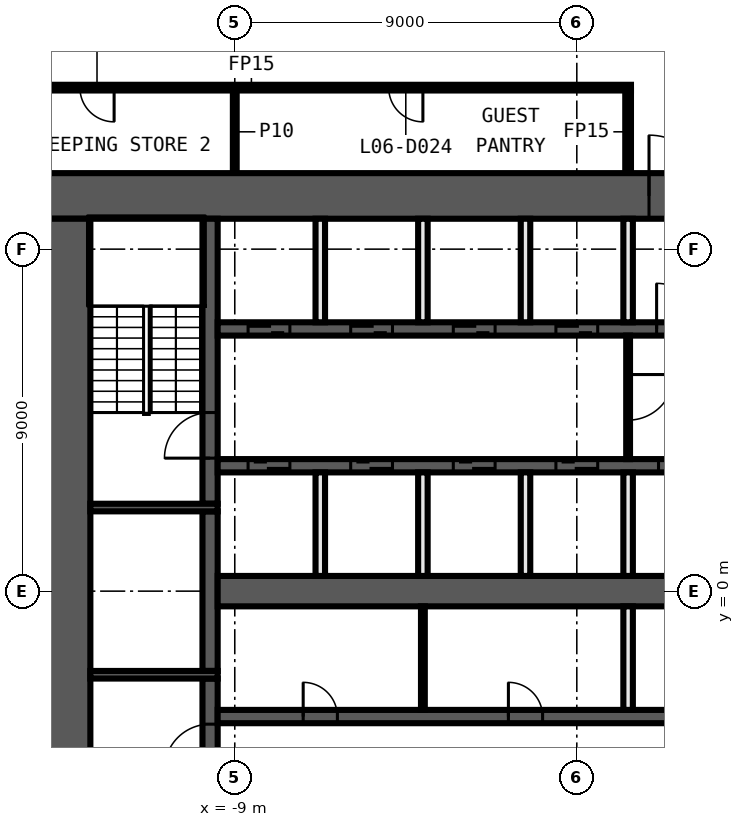
"""IFC4 building model, lengths in metres.
Left out: names, types, materials, properties, quantities, classifications, styles, units other than length and angle.
Written with IfcOpenShell. Run it as: python <this file> out.ifc"""

import sys

from ifc_helpers import new_model, si_unit, direction, frame, frame_2d, origin, place, context, subcontext, project, spatial, rectangle, extrude, element, fill, save


model = new_model("IFC4")
c1 = context("Model", 3, precision=1e-05, world=origin(), true_north=direction((0.0, 1.0)))
c2 = subcontext(c1, "Body", "Model", "MODEL_VIEW")
j1 = project(units=[si_unit("LENGTHUNIT", "METRE"), si_unit("PLANEANGLEUNIT", "RADIAN")], contexts=[c1])
p1 = place(None, origin())
s1 = spatial("IfcSite", under=j1, at=p1, CompositionType="ELEMENT")
p2 = place(p1, origin())
s2 = spatial("IfcBuilding", under=s1, at=p2, CompositionType="ELEMENT")
p3 = place(p2, frame((0.0, 0.0, 44.0)))
s3 = spatial("IfcBuildingStorey", under=s2, at=p3, CompositionType="ELEMENT", Elevation=44.0)
p4 = place(p3, frame((1.425, 13.25, 0.0), z_axis=(0.0, 0.0, 1.0), x_axis=(-1.0, 0.0, 0.0)))
e1 = element("IfcWall", 1, at=p4, inside=s3, PredefinedType="PARTITIONING", context=c2, shape_type="SweptSolid", body=[
    extrude(rectangle(XDim=17.75, YDim=0.15, at=frame_2d((8.875, 0.0))), origin(), (0.0, 0.0, 1.0), 3.3),
])
p5 = place(p4, frame((5.475, 0.0, 0.0)))
e2 = element("IfcOpeningElement", 2, at=p5, cuts=e1, PredefinedType="OPENING", context=c2, shape_type="SweptSolid", body=[
    extrude(rectangle(XDim=0.9, YDim=2.1, at=frame_2d((0.45, 1.05))), frame((0.0, 0.085, 0.0), z_axis=(0.0, -1.0, 0.0), x_axis=(1.0, 0.0, 0.0)), (0.0, 0.0, 1.0), 0.17),
])
p6 = place(p4, frame((13.6, 0.0, 0.0)))
e3 = element("IfcOpeningElement", 3, at=p6, cuts=e1, PredefinedType="OPENING", context=c2, shape_type="SweptSolid", body=[
    extrude(rectangle(XDim=0.9, YDim=2.1, at=frame_2d((0.45, 1.05))), frame((0.0, 0.085, 0.0), z_axis=(0.0, -1.0, 0.0), x_axis=(1.0, 0.0, 0.0)), (0.0, 0.0, 1.0), 0.17),
])
p7 = place(p3, frame((1.35, 11.0, 0.0), z_axis=(0.0, 0.0, 1.0), x_axis=(0.0, 1.0, 0.0)))
e4 = element("IfcWall", 4, at=p7, inside=s3, PredefinedType="PARTITIONING", context=c2, shape_type="SweptSolid", body=[
    extrude(rectangle(XDim=2.175, YDim=0.15, at=frame_2d((1.087, 0.0))), origin(), (0.0, 0.0, 1.0), 3.3),
])
p8 = place(p3, frame((-9.0, 11.0, 0.0), z_axis=(0.0, 0.0, 1.0), x_axis=(0.0, 1.0, 0.0)))
e5 = element("IfcWall", 5, at=p8, inside=s3, PredefinedType="PARTITIONING", context=c2, shape_type="SweptSolid", body=[
    extrude(rectangle(XDim=2.175, YDim=0.1, at=frame_2d((1.087, 0.0))), origin(), (0.0, 0.0, 1.0), 3.3),
])
p9 = place(p3, frame((-14.0, 10.4, 0.0), z_axis=(0.0, 0.0, 1.0), x_axis=(1.0, 0.0, 0.0)))
e6 = element("IfcWall", 6, at=p9, inside=s3, PredefinedType="SHEAR", context=c2, shape_type="SweptSolid", body=[
    extrude(rectangle(XDim=28.0, YDim=1.2, at=frame_2d((14.0, 0.0))), origin(), (0.0, 0.0, 1.0), 3.3),
])
p10 = place(p9, frame((15.9, 0.0, 0.0)))
e7 = element("IfcOpeningElement", 7, at=p10, cuts=e6, PredefinedType="OPENING", context=c2, shape_type="SweptSolid", body=[
    extrude(rectangle(XDim=1.6, YDim=2.1, at=frame_2d((0.8, 1.05))), frame((0.0, 0.61, 0.0), z_axis=(0.0, -1.0, 0.0), x_axis=(1.0, 0.0, 0.0)), (0.0, 0.0, 1.0), 1.22),
])
p11 = place(p3, frame((-13.4, -9.8, 0.0), z_axis=(0.0, 0.0, 1.0), x_axis=(0.0, 1.0, 0.0)))
e8 = element("IfcWall", 8, at=p11, inside=s3, PredefinedType="SHEAR", context=c2, shape_type="SweptSolid", body=[
    extrude(rectangle(XDim=19.6, YDim=1.2, at=frame_2d((9.8, 0.0))), origin(), (0.0, 0.0, 1.0), 3.3),
])
p12 = place(p3, frame((-9.65, -9.8, 0.0), z_axis=(0.0, 0.0, 1.0), x_axis=(0.0, 1.0, 0.0)))
e9 = element("IfcWall", 9, at=p12, inside=s3, PredefinedType="SHEAR", context=c2, shape_type="SweptSolid", body=[
    extrude(rectangle(XDim=7.5, YDim=0.4, at=frame_2d((3.75, 0.0))), origin(), (0.0, 0.0, 1.0), 3.3),
])
p13 = place(p12, frame((5.1, 0.0, 0.0)))
e10 = element("IfcOpeningElement", 10, at=p13, cuts=e9, PredefinedType="OPENING", context=c2, shape_type="SweptSolid", body=[
    extrude(rectangle(XDim=1.2, YDim=2.1, at=frame_2d((0.6, 1.05))), frame((0.0, 0.21, 0.0), z_axis=(0.0, -1.0, 0.0), x_axis=(1.0, 0.0, 0.0)), (0.0, 0.0, 1.0), 0.42),
])
p14 = place(p3, frame((-9.65, -2.1, 0.0), z_axis=(0.0, 0.0, 1.0), x_axis=(0.0, 1.0, 0.0)))
e11 = element("IfcWall", 11, at=p14, inside=s3, PredefinedType="SHEAR", context=c2, shape_type="SweptSolid", body=[
    extrude(rectangle(XDim=4.2, YDim=0.4, at=frame_2d((2.1, 0.0))), origin(), (0.0, 0.0, 1.0), 3.3),
])
p15 = place(p3, frame((-9.65, 2.3, 0.0), z_axis=(0.0, 0.0, 1.0), x_axis=(0.0, 1.0, 0.0)))
e12 = element("IfcWall", 12, at=p15, inside=s3, PredefinedType="SHEAR", context=c2, shape_type="SweptSolid", body=[
    extrude(rectangle(XDim=7.5, YDim=0.4, at=frame_2d((3.75, 0.0))), origin(), (0.0, 0.0, 1.0), 3.3),
])
p16 = place(p15, frame((1.2, 0.0, 0.0)))
e13 = element("IfcOpeningElement", 13, at=p16, cuts=e12, PredefinedType="OPENING", context=c2, shape_type="SweptSolid", body=[
    extrude(rectangle(XDim=1.2, YDim=2.1, at=frame_2d((0.6, 1.05))), frame((0.0, 0.21, 0.0), z_axis=(0.0, -1.0, 0.0), x_axis=(1.0, 0.0, 0.0)), (0.0, 0.0, 1.0), 0.42),
])
for number, where, z_axis, x_axis in (
    (14, (-9.45, 2.2, 0.0), (0.0, 0.0, 1.0), (-1.0, 0.0, 0.0)),
    (15, (-9.45, -2.2, 0.0), (0.0, 0.0, 1.0), (-1.0, 0.0, 0.0)),
):
    element("IfcWall", number, at=place(p3, frame(where, z_axis=z_axis, x_axis=x_axis)), inside=s3, PredefinedType="SHEAR", context=c2, shape_type="SweptSolid", body=[
        extrude(rectangle(XDim=3.35, YDim=0.2, at=frame_2d((1.675, 0.0))), origin(), (0.0, 0.0, 1.0), 3.3),
    ])
p17 = place(p3, frame((-9.45, 6.9, 0.0), z_axis=(0.0, 0.0, 1.0), x_axis=(1.0, 0.0, 0.0)))
e16 = element("IfcWall", 16, at=p17, inside=s3, PredefinedType="SHEAR", context=c2, shape_type="SweptSolid", body=[
    extrude(rectangle(XDim=18.9, YDim=0.35, at=frame_2d((9.45, 0.0))), origin(), (0.0, 0.0, 1.0), 3.3),
])
p18 = place(p17, frame((0.8, 0.0, 0.0)))
e17 = element("IfcOpeningElement", 17, at=p18, cuts=e16, PredefinedType="OPENING", context=c2, shape_type="SweptSolid", body=[
    extrude(rectangle(XDim=1.1, YDim=2.1, at=frame_2d((0.55, 1.05))), frame((0.0, 0.185, 0.0), z_axis=(0.0, -1.0, 0.0), x_axis=(1.0, 0.0, 0.0)), (0.0, 0.0, 1.0), 0.37),
])
p19 = place(p17, frame((3.5, 0.0, 0.0)))
e18 = element("IfcOpeningElement", 18, at=p19, cuts=e16, PredefinedType="OPENING", context=c2, shape_type="SweptSolid", body=[
    extrude(rectangle(XDim=1.1, YDim=2.1, at=frame_2d((0.55, 1.05))), frame((0.0, 0.185, 0.0), z_axis=(0.0, -1.0, 0.0), x_axis=(1.0, 0.0, 0.0)), (0.0, 0.0, 1.0), 0.37),
])
p20 = place(p17, frame((6.2, 0.0, 0.0)))
e19 = element("IfcOpeningElement", 19, at=p20, cuts=e16, PredefinedType="OPENING", context=c2, shape_type="SweptSolid", body=[
    extrude(rectangle(XDim=1.1, YDim=2.1, at=frame_2d((0.55, 1.05))), frame((0.0, 0.185, 0.0), z_axis=(0.0, -1.0, 0.0), x_axis=(1.0, 0.0, 0.0)), (0.0, 0.0, 1.0), 0.37),
])
p21 = place(p17, frame((8.9, 0.0, 0.0)))
e20 = element("IfcOpeningElement", 20, at=p21, cuts=e16, PredefinedType="OPENING", context=c2, shape_type="SweptSolid", body=[
    extrude(rectangle(XDim=1.1, YDim=2.1, at=frame_2d((0.55, 1.05))), frame((0.0, 0.185, 0.0), z_axis=(0.0, -1.0, 0.0), x_axis=(1.0, 0.0, 0.0)), (0.0, 0.0, 1.0), 0.37),
])
p22 = place(p17, frame((11.55, 0.0, 0.0)))
e21 = element("IfcOpeningElement", 21, at=p22, cuts=e16, PredefinedType="OPENING", context=c2, shape_type="SweptSolid", body=[
    extrude(rectangle(XDim=1.2, YDim=2.1, at=frame_2d((0.6, 1.05))), frame((0.0, 0.185, 0.0), z_axis=(0.0, -1.0, 0.0), x_axis=(1.0, 0.0, 0.0)), (0.0, 0.0, 1.0), 0.37),
])
p23 = place(p17, frame((14.3, 0.0, 0.0)))
e22 = element("IfcOpeningElement", 22, at=p23, cuts=e16, PredefinedType="OPENING", context=c2, shape_type="SweptSolid", body=[
    extrude(rectangle(XDim=1.1, YDim=2.1, at=frame_2d((0.55, 1.05))), frame((0.0, 0.185, 0.0), z_axis=(0.0, -1.0, 0.0), x_axis=(1.0, 0.0, 0.0)), (0.0, 0.0, 1.0), 0.37),
])
p24 = place(p17, frame((17.0, 0.0, 0.0)))
e23 = element("IfcOpeningElement", 23, at=p24, cuts=e16, PredefinedType="OPENING", context=c2, shape_type="SweptSolid", body=[
    extrude(rectangle(XDim=1.1, YDim=2.1, at=frame_2d((0.55, 1.05))), frame((0.0, 0.185, 0.0), z_axis=(0.0, -1.0, 0.0), x_axis=(1.0, 0.0, 0.0)), (0.0, 0.0, 1.0), 0.37),
])
p25 = place(p3, frame((9.45, 3.3, 0.0), z_axis=(0.0, 0.0, 1.0), x_axis=(-1.0, 0.0, 0.0)))
e24 = element("IfcWall", 24, at=p25, inside=s3, PredefinedType="SHEAR", context=c2, shape_type="SweptSolid", body=[
    extrude(rectangle(XDim=18.9, YDim=0.35, at=frame_2d((9.45, 0.0))), origin(), (0.0, 0.0, 1.0), 3.3),
])
p26 = place(p25, frame((17.0, 0.0, 0.0)))
e25 = element("IfcOpeningElement", 25, at=p26, cuts=e24, PredefinedType="OPENING", context=c2, shape_type="SweptSolid", body=[
    extrude(rectangle(XDim=1.1, YDim=2.1, at=frame_2d((0.55, 1.05))), frame((0.0, 0.185, 0.0), z_axis=(0.0, -1.0, 0.0), x_axis=(1.0, 0.0, 0.0)), (0.0, 0.0, 1.0), 0.37),
])
p27 = place(p25, frame((14.3, 0.0, 0.0)))
e26 = element("IfcOpeningElement", 26, at=p27, cuts=e24, PredefinedType="OPENING", context=c2, shape_type="SweptSolid", body=[
    extrude(rectangle(XDim=1.1, YDim=2.1, at=frame_2d((0.55, 1.05))), frame((0.0, 0.185, 0.0), z_axis=(0.0, -1.0, 0.0), x_axis=(1.0, 0.0, 0.0)), (0.0, 0.0, 1.0), 0.37),
])
p28 = place(p25, frame((11.6, 0.0, 0.0)))
e27 = element("IfcOpeningElement", 27, at=p28, cuts=e24, PredefinedType="OPENING", context=c2, shape_type="SweptSolid", body=[
    extrude(rectangle(XDim=1.1, YDim=2.1, at=frame_2d((0.55, 1.05))), frame((0.0, 0.185, 0.0), z_axis=(0.0, -1.0, 0.0), x_axis=(1.0, 0.0, 0.0)), (0.0, 0.0, 1.0), 0.37),
])
p29 = place(p25, frame((8.9, 0.0, 0.0)))
e28 = element("IfcOpeningElement", 28, at=p29, cuts=e24, PredefinedType="OPENING", context=c2, shape_type="SweptSolid", body=[
    extrude(rectangle(XDim=1.1, YDim=2.1, at=frame_2d((0.55, 1.05))), frame((0.0, 0.185, 0.0), z_axis=(0.0, -1.0, 0.0), x_axis=(1.0, 0.0, 0.0)), (0.0, 0.0, 1.0), 0.37),
])
p30 = place(p25, frame((6.2, 0.0, 0.0)))
e29 = element("IfcOpeningElement", 29, at=p30, cuts=e24, PredefinedType="OPENING", context=c2, shape_type="SweptSolid", body=[
    extrude(rectangle(XDim=1.1, YDim=2.1, at=frame_2d((0.55, 1.05))), frame((0.0, 0.185, 0.0), z_axis=(0.0, -1.0, 0.0), x_axis=(1.0, 0.0, 0.0)), (0.0, 0.0, 1.0), 0.37),
])
p31 = place(p25, frame((3.5, 0.0, 0.0)))
e30 = element("IfcOpeningElement", 30, at=p31, cuts=e24, PredefinedType="OPENING", context=c2, shape_type="SweptSolid", body=[
    extrude(rectangle(XDim=1.1, YDim=2.1, at=frame_2d((0.55, 1.05))), frame((0.0, 0.185, 0.0), z_axis=(0.0, -1.0, 0.0), x_axis=(1.0, 0.0, 0.0)), (0.0, 0.0, 1.0), 0.37),
])
p32 = place(p25, frame((0.9, 0.0, 0.0)))
e31 = element("IfcOpeningElement", 31, at=p32, cuts=e24, PredefinedType="OPENING", context=c2, shape_type="SweptSolid", body=[
    extrude(rectangle(XDim=0.9, YDim=2.1, at=frame_2d((0.45, 1.05))), frame((0.0, 0.185, 0.0), z_axis=(0.0, -1.0, 0.0), x_axis=(1.0, 0.0, 0.0)), (0.0, 0.0, 1.0), 0.37),
])
p33 = place(p3, frame((-9.45, -3.3, 0.0), z_axis=(0.0, 0.0, 1.0), x_axis=(1.0, 0.0, 0.0)))
e32 = element("IfcWall", 32, at=p33, inside=s3, PredefinedType="SHEAR", context=c2, shape_type="SweptSolid", body=[
    extrude(rectangle(XDim=18.9, YDim=0.35, at=frame_2d((9.45, 0.0))), origin(), (0.0, 0.0, 1.0), 3.3),
])
p34 = place(p33, frame((17.0, 0.0, 0.0)))
e33 = element("IfcOpeningElement", 33, at=p34, cuts=e32, PredefinedType="OPENING", context=c2, shape_type="SweptSolid", body=[
    extrude(rectangle(XDim=1.1, YDim=2.1, at=frame_2d((0.55, 1.05))), frame((0.0, 0.185, 0.0), z_axis=(0.0, -1.0, 0.0), x_axis=(1.0, 0.0, 0.0)), (0.0, 0.0, 1.0), 0.37),
])
p35 = place(p33, frame((2.25, 0.0, 0.0)))
e34 = element("IfcOpeningElement", 34, at=p35, cuts=e32, PredefinedType="OPENING", context=c2, shape_type="SweptSolid", body=[
    extrude(rectangle(XDim=0.9, YDim=2.1, at=frame_2d((0.45, 1.05))), frame((0.0, 0.185, 0.0), z_axis=(0.0, -1.0, 0.0), x_axis=(1.0, 0.0, 0.0)), (0.0, 0.0, 1.0), 0.37),
])
p36 = place(p33, frame((7.65, 0.0, 0.0)))
e35 = element("IfcOpeningElement", 35, at=p36, cuts=e32, PredefinedType="OPENING", context=c2, shape_type="SweptSolid", body=[
    extrude(rectangle(XDim=0.9, YDim=2.1, at=frame_2d((0.45, 1.05))), frame((0.0, 0.185, 0.0), z_axis=(0.0, -1.0, 0.0), x_axis=(1.0, 0.0, 0.0)), (0.0, 0.0, 1.0), 0.37),
])
p37 = place(p3, frame((-9.45, 0.0, 0.0), z_axis=(0.0, 0.0, 1.0), x_axis=(1.0, 0.0, 0.0)))
e36 = element("IfcWall", 36, at=p37, inside=s3, PredefinedType="SHEAR", context=c2, shape_type="SweptSolid", body=[
    extrude(rectangle(XDim=18.9, YDim=0.8, at=frame_2d((9.45, 0.0))), origin(), (0.0, 0.0, 1.0), 3.3),
])
p38 = place(p3, frame((1.35, 6.725, 0.0), z_axis=(0.0, 0.0, 1.0), x_axis=(0.0, -1.0, 0.0)))
e37 = element("IfcWall", 37, at=p38, inside=s3, PredefinedType="PARTITIONING", context=c2, shape_type="SweptSolid", body=[
    extrude(rectangle(XDim=3.25, YDim=0.1, at=frame_2d((1.625, 0.0))), origin(), (0.0, 0.0, 1.0), 3.3),
])
p39 = place(p38, frame((1.025, 0.0, 0.0)))
e38 = element("IfcOpeningElement", 38, at=p39, cuts=e37, PredefinedType="OPENING", context=c2, shape_type="SweptSolid", body=[
    extrude(rectangle(XDim=1.2, YDim=2.1, at=frame_2d((0.6, 1.05))), frame((0.0, 0.06, 0.0), z_axis=(0.0, -1.0, 0.0), x_axis=(1.0, 0.0, 0.0)), (0.0, 0.0, 1.0), 0.12),
])
for number, where, z_axis, x_axis in (
    (39, (1.35, -3.125, 0.0), (0.0, 0.0, 1.0), (0.0, 1.0, 0.0)),
    (40, (1.35, 0.4, 0.0), (0.0, 0.0, 1.0), (0.0, 1.0, 0.0)),
    (41, (1.35, 7.075, 0.0), (0.0, 0.0, 1.0), (0.0, 1.0, 0.0)),
    (42, (-1.35, 0.4, 0.0), (0.0, 0.0, 1.0), (0.0, 1.0, 0.0)),
    (43, (-1.35, 7.075, 0.0), (0.0, 0.0, 1.0), (0.0, 1.0, 0.0)),
):
    element("IfcWall", number, at=place(p3, frame(where, z_axis=z_axis, x_axis=x_axis)), inside=s3, PredefinedType="SOLIDWALL", context=c2, shape_type="SweptSolid", body=[
        extrude(rectangle(XDim=2.725, YDim=0.25, at=frame_2d((1.363, 0.0))), origin(), (0.0, 0.0, 1.0), 3.3),
    ])
p40 = place(p3, frame((-4.05, -3.125, 0.0), z_axis=(0.0, 0.0, 1.0), x_axis=(0.0, 1.0, 0.0)))
e44 = element("IfcWall", 44, at=p40, inside=s3, PredefinedType="PARTITIONING", context=c2, shape_type="SweptSolid", body=[
    extrude(rectangle(XDim=2.725, YDim=0.1, at=frame_2d((1.363, 0.0))), origin(), (0.0, 0.0, 1.0), 3.3),
])
for number, where, z_axis, x_axis in (
    (45, (-4.05, 0.4, 0.0), (0.0, 0.0, 1.0), (0.0, 1.0, 0.0)),
    (46, (-4.05, 7.075, 0.0), (0.0, 0.0, 1.0), (0.0, 1.0, 0.0)),
    (47, (-6.75, 0.4, 0.0), (0.0, 0.0, 1.0), (0.0, 1.0, 0.0)),
    (48, (-6.75, 7.075, 0.0), (0.0, 0.0, 1.0), (0.0, 1.0, 0.0)),
):
    element("IfcWall", number, at=place(p3, frame(where, z_axis=z_axis, x_axis=x_axis)), inside=s3, PredefinedType="SOLIDWALL", context=c2, shape_type="SweptSolid", body=[
        extrude(rectangle(XDim=2.725, YDim=0.25, at=frame_2d((1.363, 0.0))), origin(), (0.0, 0.0, 1.0), 3.3),
    ])
p41 = place(p5, origin())
e49 = element("IfcDoor", 49, at=p41, inside=s3, OperationType="SINGLE_SWING_RIGHT", PredefinedType="DOOR", context=c2, shape_type="SweptSolid", body=[
    extrude(rectangle(XDim=0.9, YDim=2.1, at=frame_2d((0.45, 1.05))), frame((0.0, 0.025, 0.0), z_axis=(0.0, -1.0, 0.0), x_axis=(1.0, 0.0, 0.0)), (0.0, 0.0, 1.0), 0.05),
])
fill(e2, e49)
p42 = place(p6, origin())
e50 = element("IfcDoor", 50, at=p42, inside=s3, OperationType="SINGLE_SWING_LEFT", PredefinedType="DOOR", context=c2, shape_type="SweptSolid", body=[
    extrude(rectangle(XDim=0.9, YDim=2.1, at=frame_2d((0.45, 1.05))), frame((0.0, 0.025, 0.0), z_axis=(0.0, -1.0, 0.0), x_axis=(1.0, 0.0, 0.0)), (0.0, 0.0, 1.0), 0.05),
])
fill(e3, e50)
p43 = place(p18, origin())
e51 = element("IfcDoor", 51, at=p43, inside=s3, OperationType="DOUBLE_DOOR_SLIDING", PredefinedType="DOOR", context=c2, shape_type="SweptSolid", body=[
    extrude(rectangle(XDim=1.1, YDim=2.1, at=frame_2d((0.55, 1.05))), frame((0.0, 0.025, 0.0), z_axis=(0.0, -1.0, 0.0), x_axis=(1.0, 0.0, 0.0)), (0.0, 0.0, 1.0), 0.05),
])
fill(e17, e51)
p44 = place(p19, origin())
e52 = element("IfcDoor", 52, at=p44, inside=s3, OperationType="DOUBLE_DOOR_SLIDING", PredefinedType="DOOR", context=c2, shape_type="SweptSolid", body=[
    extrude(rectangle(XDim=1.1, YDim=2.1, at=frame_2d((0.55, 1.05))), frame((0.0, 0.025, 0.0), z_axis=(0.0, -1.0, 0.0), x_axis=(1.0, 0.0, 0.0)), (0.0, 0.0, 1.0), 0.05),
])
fill(e18, e52)
p45 = place(p20, origin())
e53 = element("IfcDoor", 53, at=p45, inside=s3, OperationType="DOUBLE_DOOR_SLIDING", PredefinedType="DOOR", context=c2, shape_type="SweptSolid", body=[
    extrude(rectangle(XDim=1.1, YDim=2.1, at=frame_2d((0.55, 1.05))), frame((0.0, 0.025, 0.0), z_axis=(0.0, -1.0, 0.0), x_axis=(1.0, 0.0, 0.0)), (0.0, 0.0, 1.0), 0.05),
])
fill(e19, e53)
p46 = place(p21, origin())
e54 = element("IfcDoor", 54, at=p46, inside=s3, OperationType="DOUBLE_DOOR_SLIDING", PredefinedType="DOOR", context=c2, shape_type="SweptSolid", body=[
    extrude(rectangle(XDim=1.1, YDim=2.1, at=frame_2d((0.55, 1.05))), frame((0.0, 0.025, 0.0), z_axis=(0.0, -1.0, 0.0), x_axis=(1.0, 0.0, 0.0)), (0.0, 0.0, 1.0), 0.05),
])
fill(e20, e54)
p47 = place(p10, origin())
e55 = element("IfcDoor", 55, at=p47, inside=s3, OperationType="DOUBLE_DOOR_SINGLE_SWING", PredefinedType="DOOR", context=c2, shape_type="SweptSolid", body=[
    extrude(rectangle(XDim=1.6, YDim=2.1, at=frame_2d((0.8, 1.05))), frame((0.0, 0.025, 0.0), z_axis=(0.0, -1.0, 0.0), x_axis=(1.0, 0.0, 0.0)), (0.0, 0.0, 1.0), 0.05),
])
fill(e7, e55)
p48 = place(p22, origin())
e56 = element("IfcDoor", 56, at=p48, inside=s3, OperationType="SINGLE_SWING_LEFT", PredefinedType="DOOR", context=c2, shape_type="SweptSolid", body=[
    extrude(rectangle(XDim=1.2, YDim=2.1, at=frame_2d((0.6, 1.05))), frame((0.0, 0.025, 0.0), z_axis=(0.0, -1.0, 0.0), x_axis=(1.0, 0.0, 0.0)), (0.0, 0.0, 1.0), 0.05),
])
fill(e21, e56)
p49 = place(p26, origin())
e57 = element("IfcDoor", 57, at=p49, inside=s3, OperationType="DOUBLE_DOOR_SLIDING", PredefinedType="DOOR", context=c2, shape_type="SweptSolid", body=[
    extrude(rectangle(XDim=1.1, YDim=2.1, at=frame_2d((0.55, 1.05))), frame((0.0, 0.025, 0.0), z_axis=(0.0, -1.0, 0.0), x_axis=(1.0, 0.0, 0.0)), (0.0, 0.0, 1.0), 0.05),
])
fill(e25, e57)
p50 = place(p27, origin())
e58 = element("IfcDoor", 58, at=p50, inside=s3, OperationType="DOUBLE_DOOR_SLIDING", PredefinedType="DOOR", context=c2, shape_type="SweptSolid", body=[
    extrude(rectangle(XDim=1.1, YDim=2.1, at=frame_2d((0.55, 1.05))), frame((0.0, 0.025, 0.0), z_axis=(0.0, -1.0, 0.0), x_axis=(1.0, 0.0, 0.0)), (0.0, 0.0, 1.0), 0.05),
])
fill(e26, e58)
p51 = place(p28, origin())
e59 = element("IfcDoor", 59, at=p51, inside=s3, OperationType="DOUBLE_DOOR_SLIDING", PredefinedType="DOOR", context=c2, shape_type="SweptSolid", body=[
    extrude(rectangle(XDim=1.1, YDim=2.1, at=frame_2d((0.55, 1.05))), frame((0.0, 0.025, 0.0), z_axis=(0.0, -1.0, 0.0), x_axis=(1.0, 0.0, 0.0)), (0.0, 0.0, 1.0), 0.05),
])
fill(e27, e59)
p52 = place(p29, origin())
e60 = element("IfcDoor", 60, at=p52, inside=s3, OperationType="DOUBLE_DOOR_SLIDING", PredefinedType="DOOR", context=c2, shape_type="SweptSolid", body=[
    extrude(rectangle(XDim=1.1, YDim=2.1, at=frame_2d((0.55, 1.05))), frame((0.0, 0.025, 0.0), z_axis=(0.0, -1.0, 0.0), x_axis=(1.0, 0.0, 0.0)), (0.0, 0.0, 1.0), 0.05),
])
fill(e28, e60)
p53 = place(p30, origin())
e61 = element("IfcDoor", 61, at=p53, inside=s3, OperationType="DOUBLE_DOOR_SLIDING", PredefinedType="DOOR", context=c2, shape_type="SweptSolid", body=[
    extrude(rectangle(XDim=1.1, YDim=2.1, at=frame_2d((0.55, 1.05))), frame((0.0, 0.025, 0.0), z_axis=(0.0, -1.0, 0.0), x_axis=(1.0, 0.0, 0.0)), (0.0, 0.0, 1.0), 0.05),
])
fill(e29, e61)
p54 = place(p35, origin())
e62 = element("IfcDoor", 62, at=p54, inside=s3, OperationType="SINGLE_SWING_RIGHT", PredefinedType="DOOR", context=c2, shape_type="SweptSolid", body=[
    extrude(rectangle(XDim=0.9, YDim=2.1, at=frame_2d((0.45, 1.05))), frame((0.0, 0.025, 0.0), z_axis=(0.0, -1.0, 0.0), x_axis=(1.0, 0.0, 0.0)), (0.0, 0.0, 1.0), 0.05),
])
fill(e34, e62)
p55 = place(p36, origin())
e63 = element("IfcDoor", 63, at=p55, inside=s3, OperationType="SINGLE_SWING_LEFT", PredefinedType="DOOR", context=c2, shape_type="SweptSolid", body=[
    extrude(rectangle(XDim=0.9, YDim=2.1, at=frame_2d((0.45, 1.05))), frame((0.0, 0.025, 0.0), z_axis=(0.0, -1.0, 0.0), x_axis=(1.0, 0.0, 0.0)), (0.0, 0.0, 1.0), 0.05),
])
fill(e35, e63)
p56 = place(p16, origin())
e64 = element("IfcDoor", 64, at=p56, inside=s3, OperationType="SINGLE_SWING_RIGHT", PredefinedType="DOOR", context=c2, shape_type="SweptSolid", body=[
    extrude(rectangle(XDim=1.2, YDim=2.1, at=frame_2d((0.6, 1.05))), frame((0.0, 0.025, 0.0), z_axis=(0.0, -1.0, 0.0), x_axis=(1.0, 0.0, 0.0)), (0.0, 0.0, 1.0), 0.05),
])
fill(e13, e64)
p57 = place(p13, origin())
e65 = element("IfcDoor", 65, at=p57, inside=s3, OperationType="SINGLE_SWING_LEFT", PredefinedType="DOOR", context=c2, shape_type="SweptSolid", body=[
    extrude(rectangle(XDim=1.2, YDim=2.1, at=frame_2d((0.6, 1.05))), frame((0.0, 0.025, 0.0), z_axis=(0.0, -1.0, 0.0), x_axis=(1.0, 0.0, 0.0)), (0.0, 0.0, 1.0), 0.05),
])
fill(e10, e65)
p58 = place(p39, origin())
e66 = element("IfcDoor", 66, at=p58, inside=s3, OperationType="SINGLE_SWING_LEFT", PredefinedType="DOOR", context=c2, shape_type="SweptSolid", body=[
    extrude(rectangle(XDim=1.2, YDim=2.1, at=frame_2d((0.6, 1.05))), frame((0.0, 0.025, 0.0), z_axis=(0.0, -1.0, 0.0), x_axis=(1.0, 0.0, 0.0)), (0.0, 0.0, 1.0), 0.05),
])
fill(e38, e66)
save(model, sys.argv[1])
